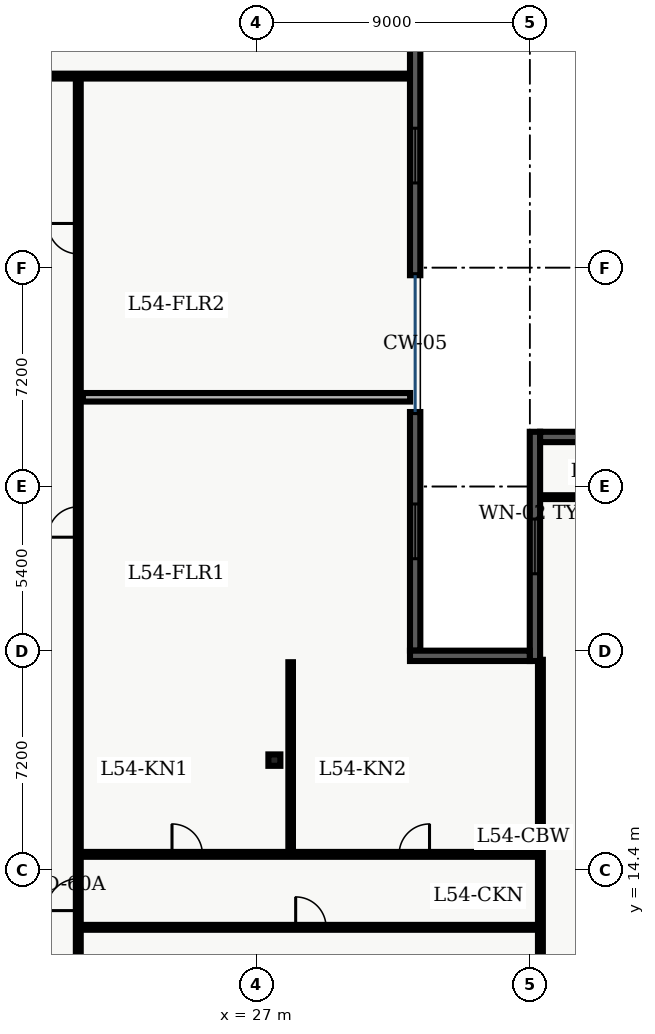
"""IFC4 building model, lengths in metres.
Left out: names, types, materials, properties, quantities, classifications, styles, units other than length and angle.
Written with IfcOpenShell. Run it as: python <this file> out.ifc"""

import sys

from ifc_helpers import new_model, entity, si_unit, converted_unit, direction, frame, origin_with_axes, origin_2d_with_axis, place, context, subcontext, project, spatial, polyline, rectangle, i_section, outline, extrude, element, fill, save


model = new_model("IFC4")
c1 = context("Model", 3, precision=1e-05, world=origin_with_axes(), true_north=direction((0.0, 1.0)))
c2 = subcontext(c1, "Body", "Model", "MODEL_VIEW")
j1 = project(units=[si_unit("LENGTHUNIT", "METRE"), converted_unit("PLANEANGLEUNIT", "DEGREE", entity("IfcPlaneAngleMeasure", 0.017), si_unit("PLANEANGLEUNIT", "RADIAN"), dimensions=[0, 0, 0, 0, 0, 0, 0])], contexts=[c1])
p1 = place(None, origin_with_axes())
s1 = spatial("IfcSite", under=j1, at=p1, CompositionType="ELEMENT")
p2 = place(p1, origin_with_axes())
s2 = spatial("IfcBuilding", under=s1, at=p2, CompositionType="ELEMENT")
p3 = place(p2, frame((0.0, 0.0, 219.9), z_axis=(0.0, 0.0, 1.0), x_axis=(1.0, 0.0, 0.0)))
s3 = spatial("IfcBuildingStorey", under=s2, at=p3, CompositionType="ELEMENT", Elevation=219.9)
p4 = place(p3, frame((27.6, 18.0, 0.0), z_axis=(0.0, 0.0, 1.0), x_axis=(1.0, 0.0, 0.0)))
e1 = element("IfcColumn", 1, at=p4, inside=s3, PredefinedType="COLUMN", context=c2, shape_type="SweptSolid", body=[
    extrude(i_section(OverallWidth=0.394, OverallDepth=0.375, WebThickness=0.017, FlangeThickness=0.028, FilletRadius=0.02, at=origin_2d_with_axis()), origin_with_axes(), (0.0, 0.0, 1.0), 4.8),
])
p5 = place(p3, frame((7.1, 40.5, 0.0), z_axis=(0.0, 0.0, 1.0), x_axis=(1.0, 0.0, 0.0)))
e2 = element("IfcWall", 2, at=p5, inside=s3, PredefinedType="PARTITIONING", context=c2, shape_type="SweptSolid", body=[
    extrude(outline(polyline([(0.0, -0.08), (24.965, -0.08), (24.965, 0.08), (0.0, 0.08), (0.0, -0.08)])), origin_with_axes(), (0.0, 0.0, 1.0), 3.2),
])
p6 = place(p5, frame((3.395, 0.0, 0.0), z_axis=(0.0, 0.0, 1.0), x_axis=(1.0, 0.0, 0.0)))
e3 = element("IfcOpeningElement", 3, at=p6, cuts=e2, PredefinedType="OPENING", context=c2, shape_type="SweptSolid", body=[
    extrude(rectangle(XDim=1.0, YDim=0.18, at=origin_2d_with_axis()), origin_with_axes(), (0.0, 0.0, 1.0), 2.15),
])
p7 = place(p5, frame((8.66, 0.0, 0.0), z_axis=(0.0, 0.0, 1.0), x_axis=(1.0, 0.0, 0.0)))
e4 = element("IfcOpeningElement", 4, at=p7, cuts=e2, PredefinedType="OPENING", context=c2, shape_type="SweptSolid", body=[
    extrude(rectangle(XDim=1.0, YDim=0.18, at=origin_2d_with_axis()), origin_with_axes(), (0.0, 0.0, 1.0), 2.15),
])
p8 = place(p3, frame((21.15, 7.8, 0.0), z_axis=(0.0, 0.0, 1.0), x_axis=(0.0, 1.0, 0.0)))
e5 = element("IfcWall", 5, at=p8, inside=s3, PredefinedType="PARTITIONING", context=c2, shape_type="SweptSolid", body=[
    extrude(outline(polyline([(0.0, -0.08), (32.7, -0.08), (32.7, 0.08), (0.0, 0.08), (0.0, -0.08)])), origin_with_axes(), (0.0, 0.0, 1.0), 3.2),
])
p9 = place(p8, frame((18.032, 0.0, 0.0), z_axis=(0.0, 0.0, 1.0), x_axis=(1.0, 0.0, 0.0)))
e6 = element("IfcOpeningElement", 6, at=p9, cuts=e5, PredefinedType="OPENING", context=c2, shape_type="SweptSolid", body=[
    extrude(rectangle(XDim=1.0, YDim=0.18, at=origin_2d_with_axis()), origin_with_axes(), (0.0, 0.0, 1.0), 2.15),
])
p10 = place(p8, frame((27.352, 0.0, 0.0), z_axis=(0.0, 0.0, 1.0), x_axis=(1.0, 0.0, 0.0)))
e7 = element("IfcOpeningElement", 7, at=p10, cuts=e5, PredefinedType="OPENING", context=c2, shape_type="SweptSolid", body=[
    extrude(rectangle(XDim=1.0, YDim=0.18, at=origin_2d_with_axis()), origin_with_axes(), (0.0, 0.0, 1.0), 2.15),
])
p11 = place(p8, frame((5.775, 0.0, 0.0), z_axis=(0.0, 0.0, 1.0), x_axis=(1.0, 0.0, 0.0)))
e8 = element("IfcOpeningElement", 8, at=p11, cuts=e5, PredefinedType="OPENING", context=c2, shape_type="SweptSolid", body=[
    extrude(rectangle(XDim=1.05, YDim=0.18, at=origin_2d_with_axis()), origin_with_axes(), (0.0, 0.0, 1.0), 2.15),
])
p12 = place(p3, frame((21.3, 29.935, 0.0), z_axis=(0.0, 0.0, 1.0), x_axis=(1.0, 0.0, 0.0)))
e9 = element("IfcWall", 9, at=p12, inside=s3, PredefinedType="PARTITIONING", context=c2, shape_type="SweptSolid", body=[
    extrude(outline(polyline([(0.0, -0.14), (10.765, -0.14), (10.765, 0.14), (0.0, 0.14), (0.0, -0.14)])), origin_with_axes(), (0.0, 0.0, 1.0), 3.2),
])
p13 = place(p3, frame((21.15, 12.5, 0.0), z_axis=(0.0, 0.0, 1.0), x_axis=(1.0, 0.0, 0.0)))
e10 = element("IfcWall", 10, at=p13, inside=s3, PredefinedType="PARTITIONING", context=c2, shape_type="SweptSolid", body=[
    extrude(outline(polyline([(0.0, -0.08), (15.2, -0.08), (15.2, 0.08), (0.0, 0.08), (0.0, -0.08)])), origin_with_axes(), (0.0, 0.0, 1.0), 3.2),
])
p14 = place(p13, frame((7.65, 0.0, 0.0), z_axis=(0.0, 0.0, 1.0), x_axis=(1.0, 0.0, 0.0)))
e11 = element("IfcOpeningElement", 11, at=p14, cuts=e10, PredefinedType="OPENING", context=c2, shape_type="SweptSolid", body=[
    extrude(rectangle(XDim=1.0, YDim=0.18, at=origin_2d_with_axis()), origin_with_axes(), (0.0, 0.0, 1.0), 2.15),
])
p15 = place(p3, frame((21.15, 14.9, 0.0), z_axis=(0.0, 0.0, 1.0), x_axis=(1.0, 0.0, 0.0)))
e12 = element("IfcWall", 12, at=p15, inside=s3, PredefinedType="PARTITIONING", context=c2, shape_type="SweptSolid", body=[
    extrude(outline(polyline([(0.0, -0.08), (15.2, -0.08), (15.2, 0.08), (0.0, 0.08), (0.0, -0.08)])), origin_with_axes(), (0.0, 0.0, 1.0), 3.2),
])
p16 = place(p15, frame((3.583, 0.0, 0.0), z_axis=(0.0, 0.0, 1.0), x_axis=(1.0, 0.0, 0.0)))
e13 = element("IfcOpeningElement", 13, at=p16, cuts=e12, PredefinedType="OPENING", context=c2, shape_type="SweptSolid", body=[
    extrude(rectangle(XDim=1.0, YDim=0.18, at=origin_2d_with_axis()), origin_with_axes(), (0.0, 0.0, 1.0), 2.15),
])
p17 = place(p15, frame((11.053, 0.0, 0.0), z_axis=(0.0, 0.0, 1.0), x_axis=(1.0, 0.0, 0.0)))
e14 = element("IfcOpeningElement", 14, at=p17, cuts=e12, PredefinedType="OPENING", context=c2, shape_type="SweptSolid", body=[
    extrude(rectangle(XDim=1.0, YDim=0.18, at=origin_2d_with_axis()), origin_with_axes(), (0.0, 0.0, 1.0), 2.15),
])
p18 = place(p3, frame((36.35, 4.35, 0.0), z_axis=(0.0, 0.0, 1.0), x_axis=(0.0, 1.0, 0.0)))
e15 = element("IfcWall", 15, at=p18, inside=s3, PredefinedType="PARTITIONING", context=c2, shape_type="SweptSolid", body=[
    extrude(outline(polyline([(0.0, -0.08), (16.95, -0.08), (16.95, 0.08), (0.0, 0.08), (0.0, -0.08)])), origin_with_axes(), (0.0, 0.0, 1.0), 3.2),
])
p19 = place(p3, frame((28.135, 15.02, 0.0), z_axis=(0.0, 0.0, 1.0), x_axis=(0.0, 1.0, 0.0)))
e16 = element("IfcWall", 16, at=p19, inside=s3, PredefinedType="PARTITIONING", context=c2, shape_type="SweptSolid", body=[
    extrude(outline(polyline([(0.0, -0.075), (6.2, -0.075), (6.2, 0.075), (0.0, 0.075), (0.0, -0.075)])), origin_with_axes(), (0.0, 0.0, 1.0), 3.2),
])
p20 = place(p3, frame((36.335, 26.65, 0.0), z_axis=(0.0, 0.0, 1.0), x_axis=(1.0, 0.0, 0.0)))
e17 = element("IfcWall", 17, at=p20, inside=s3, PredefinedType="PARTITIONING", context=c2, shape_type="SweptSolid", body=[
    extrude(outline(polyline([(0.0, -0.062), (11.195, -0.062), (11.195, 0.062), (0.0, 0.062), (0.0, -0.062)])), origin_with_axes(), (0.0, 0.0, 1.0), 3.2),
])
p21 = place(p20, frame((6.665, 0.0, 0.0), z_axis=(0.0, 0.0, 1.0), x_axis=(1.0, 0.0, 0.0)))
e18 = element("IfcOpeningElement", 18, at=p21, cuts=e17, PredefinedType="OPENING", context=c2, shape_type="SweptSolid", body=[
    extrude(rectangle(XDim=1.0, YDim=0.145, at=origin_2d_with_axis()), origin_with_axes(), (0.0, 0.0, 1.0), 2.15),
])
p22 = place(p3, frame((36.17, 21.26, 0.0), z_axis=(0.0, 0.0, 1.0), x_axis=(0.0, 1.0, 0.0)))
e19 = element("IfcWall", 19, at=p22, inside=s3, PredefinedType="SOLIDWALL", context=c2, shape_type="SweptSolid", body=[
    extrude(outline(polyline([(0.0, -0.17), (7.54, -0.17), (7.54, 0.17), (0.0, 0.17), (0.0, -0.17)])), origin_with_axes(), (0.0, 0.0, 1.0), 4.56),
])
p23 = place(p22, frame((3.77, 0.0, 0.45), z_axis=(0.0, 0.0, 1.0), x_axis=(1.0, 0.0, 0.0)))
e20 = element("IfcOpeningElement", 20, at=p23, cuts=e19, PredefinedType="OPENING", context=c2, shape_type="SweptSolid", body=[
    extrude(rectangle(XDim=1.8, YDim=0.36, at=origin_2d_with_axis()), origin_with_axes(), (0.0, 0.0, 1.0), 2.1),
])
p24 = place(p3, frame((36.34, 28.63, 0.0), z_axis=(0.0, 0.0, 1.0), x_axis=(1.0, 0.0, 0.0)))
e21 = element("IfcWall", 21, at=p24, inside=s3, PredefinedType="SOLIDWALL", context=c2, shape_type="SweptSolid", body=[
    extrude(outline(polyline([(0.0, -0.17), (13.46, -0.17), (13.46, 0.17), (0.0, 0.17), (0.0, -0.17)])), origin_with_axes(), (0.0, 0.0, 1.0), 4.56),
])
p25 = place(p24, frame((3.665, 0.0, 0.45), z_axis=(0.0, 0.0, 1.0), x_axis=(1.0, 0.0, 0.0)))
e22 = element("IfcOpeningElement", 22, at=p25, cuts=e21, PredefinedType="OPENING", context=c2, shape_type="SweptSolid", body=[
    extrude(rectangle(XDim=1.8, YDim=0.36, at=origin_2d_with_axis()), origin_with_axes(), (0.0, 0.0, 1.0), 2.1),
])
p26 = place(p24, frame((9.795, 0.0, 0.45), z_axis=(0.0, 0.0, 1.0), x_axis=(1.0, 0.0, 0.0)))
e23 = element("IfcOpeningElement", 23, at=p26, cuts=e21, PredefinedType="OPENING", context=c2, shape_type="SweptSolid", body=[
    extrude(rectangle(XDim=1.8, YDim=0.36, at=origin_2d_with_axis()), origin_with_axes(), (0.0, 0.0, 1.0), 2.1),
])
p27 = place(p3, frame((32.23, 41.82, 0.0), z_axis=(0.0, 0.0, 1.0), x_axis=(0.0, -1.0, 0.0)))
e24 = element("IfcWall", 24, at=p27, inside=s3, PredefinedType="SOLIDWALL", context=c2, shape_type="SweptSolid", body=[
    extrude(outline(polyline([(0.0, -0.17), (7.87, -0.17), (7.87, 0.17), (0.0, 0.17), (0.0, -0.17)])), origin_with_axes(), (0.0, 0.0, 1.0), 4.56),
])
p28 = place(p27, frame((3.935, 0.0, 0.45), z_axis=(0.0, 0.0, 1.0), x_axis=(1.0, 0.0, 0.0)))
e25 = element("IfcOpeningElement", 25, at=p28, cuts=e24, PredefinedType="OPENING", context=c2, shape_type="SweptSolid", body=[
    extrude(rectangle(XDim=1.8, YDim=0.36, at=origin_2d_with_axis()), origin_with_axes(), (0.0, 0.0, 1.0), 2.1),
])
p29 = place(p3, frame((32.23, 29.45, 0.0), z_axis=(0.0, 0.0, 1.0), x_axis=(0.0, -1.0, 0.0)))
e26 = element("IfcWall", 26, at=p29, inside=s3, PredefinedType="SOLIDWALL", context=c2, shape_type="SweptSolid", body=[
    extrude(outline(polyline([(0.0, -0.17), (7.85, -0.17), (7.85, 0.17), (0.0, 0.17), (0.0, -0.17)])), origin_with_axes(), (0.0, 0.0, 1.0), 4.56),
])
p30 = place(p29, frame((3.925, 0.0, 0.45), z_axis=(0.0, 0.0, 1.0), x_axis=(1.0, 0.0, 0.0)))
e27 = element("IfcOpeningElement", 27, at=p30, cuts=e26, PredefinedType="OPENING", context=c2, shape_type="SweptSolid", body=[
    extrude(rectangle(XDim=1.8, YDim=0.36, at=origin_2d_with_axis()), origin_with_axes(), (0.0, 0.0, 1.0), 2.1),
])
p31 = place(p3, frame((32.06, 21.43, 0.0), z_axis=(0.0, 0.0, 1.0), x_axis=(1.0, 0.0, 0.0)))
e28 = element("IfcWall", 28, at=p31, inside=s3, PredefinedType="SOLIDWALL", context=c2, shape_type="SweptSolid", body=[
    extrude(outline(polyline([(0.0, -0.17), (3.94, -0.17), (3.94, 0.17), (0.0, 0.17), (0.0, -0.17)])), origin_with_axes(), (0.0, 0.0, 1.0), 4.56),
])
p32 = place(p8, frame((18.032, 0.0, 0.0), z_axis=(0.0, 0.0, 1.0), x_axis=(1.0, 0.0, 0.0)))
e29 = element("IfcDoor", 29, at=p32, inside=s3, OperationType="SINGLE_SWING_LEFT", PredefinedType="DOOR", context=c2, shape_type="SweptSolid", body=[
    extrude(rectangle(XDim=1.0, YDim=0.09, at=origin_2d_with_axis()), origin_with_axes(), (0.0, 0.0, 1.0), 2.15),
])
fill(e6, e29)
p33 = place(p8, frame((27.352, 0.0, 0.0), z_axis=(0.0, 0.0, 1.0), x_axis=(1.0, 0.0, 0.0)))
e30 = element("IfcDoor", 30, at=p33, inside=s3, OperationType="SINGLE_SWING_RIGHT", PredefinedType="DOOR", context=c2, shape_type="SweptSolid", body=[
    extrude(rectangle(XDim=1.0, YDim=0.09, at=origin_2d_with_axis()), origin_with_axes(), (0.0, 0.0, 1.0), 2.15),
])
fill(e7, e30)
p34 = place(p8, frame((5.775, 0.0, 0.0), z_axis=(0.0, 0.0, 1.0), x_axis=(1.0, 0.0, 0.0)))
e31 = element("IfcDoor", 31, at=p34, inside=s3, OperationType="SINGLE_SWING_LEFT", PredefinedType="DOOR", context=c2, shape_type="SweptSolid", body=[
    extrude(rectangle(XDim=1.05, YDim=0.09, at=origin_2d_with_axis()), origin_with_axes(), (0.0, 0.0, 1.0), 2.15),
])
fill(e8, e31)
p35 = place(p13, frame((7.65, 0.0, 0.0), z_axis=(0.0, 0.0, 1.0), x_axis=(1.0, 0.0, 0.0)))
e32 = element("IfcDoor", 32, at=p35, inside=s3, OperationType="SINGLE_SWING_LEFT", PredefinedType="DOOR", context=c2, shape_type="SweptSolid", body=[
    extrude(rectangle(XDim=1.0, YDim=0.09, at=origin_2d_with_axis()), origin_with_axes(), (0.0, 0.0, 1.0), 2.15),
])
fill(e11, e32)
p36 = place(p15, frame((3.583, 0.0, 0.0), z_axis=(0.0, 0.0, 1.0), x_axis=(1.0, 0.0, 0.0)))
e33 = element("IfcDoor", 33, at=p36, inside=s3, OperationType="SINGLE_SWING_LEFT", PredefinedType="DOOR", context=c2, shape_type="SweptSolid", body=[
    extrude(rectangle(XDim=1.0, YDim=0.09, at=origin_2d_with_axis()), origin_with_axes(), (0.0, 0.0, 1.0), 2.15),
])
fill(e13, e33)
p37 = place(p15, frame((11.053, 0.0, 0.0), z_axis=(0.0, 0.0, 1.0), x_axis=(1.0, 0.0, 0.0)))
e34 = element("IfcDoor", 34, at=p37, inside=s3, OperationType="SINGLE_SWING_RIGHT", PredefinedType="DOOR", context=c2, shape_type="SweptSolid", body=[
    extrude(rectangle(XDim=1.0, YDim=0.09, at=origin_2d_with_axis()), origin_with_axes(), (0.0, 0.0, 1.0), 2.15),
])
fill(e14, e34)
p38 = place(p22, frame((3.77, 0.0, 0.45), z_axis=(0.0, 0.0, 1.0), x_axis=(1.0, 0.0, 0.0)))
e35 = element("IfcWindow", 35, at=p38, inside=s3, PredefinedType="WINDOW", context=c2, shape_type="SweptSolid", body=[
    extrude(rectangle(XDim=1.8, YDim=0.09, at=origin_2d_with_axis()), origin_with_axes(), (0.0, 0.0, 1.0), 2.1),
])
fill(e20, e35)
p39 = place(p27, frame((3.935, 0.0, 0.45), z_axis=(0.0, 0.0, 1.0), x_axis=(1.0, 0.0, 0.0)))
e36 = element("IfcWindow", 36, at=p39, inside=s3, PredefinedType="WINDOW", context=c2, shape_type="SweptSolid", body=[
    extrude(rectangle(XDim=1.8, YDim=0.09, at=origin_2d_with_axis()), origin_with_axes(), (0.0, 0.0, 1.0), 2.1),
])
fill(e25, e36)
p40 = place(p29, frame((3.925, 0.0, 0.45), z_axis=(0.0, 0.0, 1.0), x_axis=(1.0, 0.0, 0.0)))
e37 = element("IfcWindow", 37, at=p40, inside=s3, PredefinedType="WINDOW", context=c2, shape_type="SweptSolid", body=[
    extrude(rectangle(XDim=1.8, YDim=0.09, at=origin_2d_with_axis()), origin_with_axes(), (0.0, 0.0, 1.0), 2.1),
])
fill(e27, e37)
save(model, sys.argv[1])
